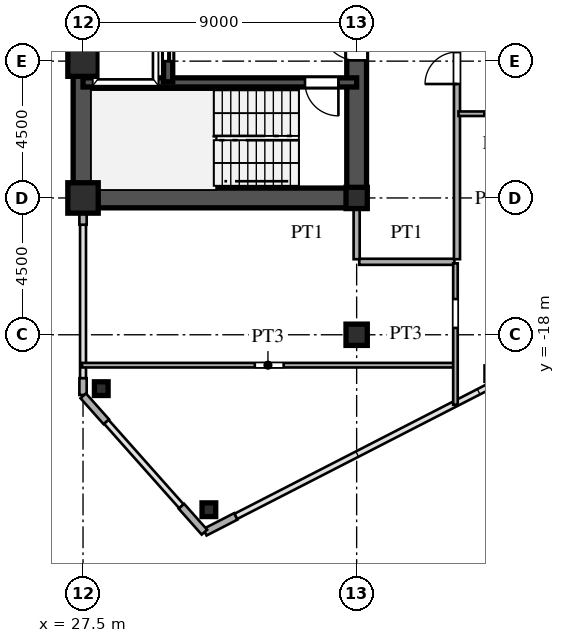
"""IFC4 building model, lengths in metres.
Left out: names, types, materials, properties, quantities, classifications, styles, units other than length and angle.
Written with IfcOpenShell. Run it as: python <this file> out.ifc"""

import sys

from ifc_helpers import new_model, si_unit, direction, frame, frame_2d, origin, origin_2d, place, context, subcontext, project, spatial, rectangle, hollow_rectangle, i_section, extrude, source, transform, mapped, element, fill, save


model = new_model("IFC4")
c1 = context("Model", 3, precision=1e-05, world=origin(), true_north=direction((0.0, 1.0)))
c2 = subcontext(c1, "Body", "Model", "MODEL_VIEW")
j1 = project(units=[si_unit("LENGTHUNIT", "METRE"), si_unit("PLANEANGLEUNIT", "RADIAN")], contexts=[c1])
p1 = place(None, origin())
s1 = spatial("IfcSite", under=j1, at=p1, CompositionType="ELEMENT")
p2 = place(p1, origin())
s2 = spatial("IfcBuilding", under=s1, at=p2, CompositionType="ELEMENT")
p3 = place(p2, frame((0.0, 0.0, 124.8)))
s3 = spatial("IfcBuildingStorey", under=s2, at=p3, CompositionType="ELEMENT", Elevation=124.8)
m1 = source(origin(), c2, "Body", "SweptSolid", [
    extrude(hollow_rectangle(XDim=1.0, YDim=1.0, WallThickness=0.042, at=origin_2d()), origin(), (0.0, 0.0, 1.0), 3.6),
])
for number, where, z_axis, x_axis in (
    (1, (27.5, -13.5, 0.0), (0.0, 0.0, 1.0), (1.0, 0.0, 0.0)),
    (2, (27.5, -9.0, 0.0), (0.0, 0.0, 1.0), (1.0, 0.0, 0.0)),
):
    element("IfcColumn", number, at=place(p3, frame(where, z_axis=z_axis, x_axis=x_axis)), inside=s3, PredefinedType="COLUMN", context=c2, shape_type="MappedRepresentation", body=[
        mapped(m1, transform((0.0, 0.0, 0.0), scale=1.0)),
    ])
m2 = source(origin(), c2, "Body", "SweptSolid", [
    extrude(i_section(OverallWidth=0.7, OverallDepth=0.7, WebThickness=0.028, FlangeThickness=0.045, at=origin_2d()), origin(), (0.0, 0.0, 1.0), 3.6),
])
for number, where, z_axis, x_axis in (
    (3, (36.5, -18.0, 0.0), (0.0, 0.0, 1.0), (1.0, 0.0, 0.0)),
    (4, (36.5, -13.5, 0.0), (0.0, 0.0, 1.0), (1.0, 0.0, 0.0)),
):
    element("IfcColumn", number, at=place(p3, frame(where, z_axis=z_axis, x_axis=x_axis)), inside=s3, PredefinedType="COLUMN", context=c2, shape_type="MappedRepresentation", body=[
        mapped(m2, transform((0.0, 0.0, 0.0), scale=1.0)),
    ])
m3 = source(origin(), c2, "Body", "SweptSolid", [
    extrude(hollow_rectangle(XDim=0.45, YDim=0.45, WallThickness=0.018, at=origin_2d()), origin(), (0.0, 0.0, 1.0), 3.6),
])
for number, where, z_axis, x_axis in (
    (5, (31.64, -23.754, 0.0), (0.0, 0.0, 1.0), (1.0, 0.0, 0.0)),
    (6, (28.1, -19.772, 0.0), (0.0, 0.0, 1.0), (1.0, 0.0, 0.0)),
):
    element("IfcColumn", number, at=place(p3, frame(where, z_axis=z_axis, x_axis=x_axis)), inside=s3, PredefinedType="COLUMN", context=c2, shape_type="MappedRepresentation", body=[
        mapped(m3, transform((0.0, 0.0, 0.0), scale=1.0)),
    ])
p4 = place(p3, frame((31.509, -24.495, 0.0), z_axis=(0.0, 0.0, 1.0), x_axis=(0.889797395748, 0.456355776255, 0.0)))
e7 = element("IfcWall", 7, at=p4, inside=s3, PredefinedType="SOLIDWALL", context=c2, shape_type="SweptSolid", body=[
    extrude(rectangle(XDim=1.14, YDim=0.24, at=frame_2d((0.57, 0.0))), origin(), (0.0, 0.0, 1.0), 3.38),
])
p5 = place(p3, frame((27.5, -19.98, 0.0), z_axis=(0.0, 0.0, 1.0), x_axis=(0.0, 1.0, 0.0)))
e8 = element("IfcWall", 8, at=p5, inside=s3, PredefinedType="SOLIDWALL", context=c2, shape_type="SweptSolid", body=[
    extrude(rectangle(XDim=0.55, YDim=0.24, at=frame_2d((0.275, 0.0))), origin(), (0.0, 0.0, 1.0), 3.38),
])
p6 = place(p3, frame((27.5, -14.38, 0.0), z_axis=(0.0, 0.0, 1.0), x_axis=(0.0, 1.0, 0.0)))
e9 = element("IfcWall", 9, at=p6, inside=s3, PredefinedType="SOLIDWALL", context=c2, shape_type="SweptSolid", body=[
    extrude(rectangle(XDim=0.55, YDim=0.24, at=frame_2d((0.275, 0.0))), origin(), (0.0, 0.0, 1.0), 2.88),
])
for number, where, z_axis, x_axis in (
    (10, (27.507, -20.008, 0.0), (0.0, 0.0, 1.0), (0.664, -0.747, 0.0)),
    (11, (30.736, -23.64, 0.0), (0.0, 0.0, 1.0), (0.664, -0.747, 0.0)),
):
    element("IfcWall", number, at=place(p3, frame(where, z_axis=z_axis, x_axis=x_axis)), inside=s3, PredefinedType="SOLIDWALL", context=c2, shape_type="SweptSolid", body=[
        extrude(rectangle(XDim=1.14, YDim=0.24, at=frame_2d((0.57, 0.0))), origin(), (0.0, 0.0, 1.0), 3.38),
    ])
p7 = place(p3, frame((27.5, -13.5, 0.0), z_axis=(0.0, 0.0, 1.0), x_axis=(0.0, 1.0, 0.0)))
e12 = element("IfcWall", 12, at=p7, inside=s3, PredefinedType="SHEAR", context=c2, shape_type="SweptSolid", body=[
    extrude(rectangle(XDim=12.2, YDim=0.65, at=frame_2d((6.1, 0.0))), origin(), (0.0, 0.0, 1.0), 3.38),
])
p8 = place(p3, frame((27.5, -13.5, 0.0), z_axis=(0.0, 0.0, 1.0), x_axis=(1.0, 0.0, 0.0)))
e13 = element("IfcWall", 13, at=p8, inside=s3, PredefinedType="SHEAR", context=c2, shape_type="SweptSolid", body=[
    extrude(rectangle(XDim=9.0, YDim=0.65, at=frame_2d((4.5, 0.0))), origin(), (0.0, 0.0, 1.0), 3.38),
])
p9 = place(p3, frame((36.5, -13.65, 0.0), z_axis=(0.0, 0.0, 1.0), x_axis=(0.0, 1.0, 0.0)))
e14 = element("IfcWall", 14, at=p9, inside=s3, PredefinedType="SHEAR", context=c2, shape_type="SweptSolid", body=[
    extrude(rectangle(XDim=7.15, YDim=0.65, at=frame_2d((3.575, 0.0))), origin(), (0.0, 0.0, 1.0), 3.38),
])
p10 = place(p9, frame((4.675, 0.0, 0.0)))
e15 = element("IfcOpeningElement", 15, at=p10, cuts=e14, PredefinedType="OPENING", context=c2, shape_type="SweptSolid", body=[
    extrude(rectangle(XDim=1.15, YDim=2.2, at=frame_2d((0.575, 1.1))), frame((0.0, 0.335, 0.0), z_axis=(0.0, -1.0, 0.0), x_axis=(1.0, 0.0, 0.0)), (0.0, 0.0, 1.0), 0.67),
])
p11 = place(p3, frame((27.5, -9.7, 0.0), z_axis=(0.0, 0.0, 1.0), x_axis=(1.0, 0.0, 0.0)))
e16 = element("IfcWall", 16, at=p11, inside=s3, PredefinedType="SHEAR", context=c2, shape_type="SweptSolid", body=[
    extrude(rectangle(XDim=9.0, YDim=0.3, at=frame_2d((4.5, 0.0))), origin(), (0.0, 0.0, 1.0), 3.38),
])
p12 = place(p11, frame((7.3, 0.0, 0.0)))
e17 = element("IfcOpeningElement", 17, at=p12, cuts=e16, PredefinedType="OPENING", context=c2, shape_type="SweptSolid", body=[
    extrude(rectangle(XDim=1.1, YDim=2.2, at=frame_2d((0.55, 1.1))), frame((0.0, 0.16, 0.0), z_axis=(0.0, -1.0, 0.0), x_axis=(1.0, 0.0, 0.0)), (0.0, 0.0, 1.0), 0.32),
])
p13 = place(p3, frame((30.3, -9.68, 0.0), z_axis=(0.0, 0.0, 1.0), x_axis=(0.0, 1.0, 0.0)))
e18 = element("IfcWall", 18, at=p13, inside=s3, PredefinedType="SHEAR", context=c2, shape_type="SweptSolid", body=[
    extrude(rectangle(XDim=2.56, YDim=0.3, at=frame_2d((1.28, 0.0))), origin(), (0.0, 0.0, 1.0), 3.38),
])
p14 = place(p13, frame((0.68, 0.0, 0.0)))
e19 = element("IfcOpeningElement", 19, at=p14, cuts=e18, PredefinedType="OPENING", context=c2, shape_type="SweptSolid", body=[
    extrude(rectangle(XDim=1.2, YDim=2.25, at=frame_2d((0.6, 1.125))), frame((0.0, 0.16, 0.0), z_axis=(0.0, -1.0, 0.0), x_axis=(1.0, 0.0, 0.0)), (0.0, 0.0, 1.0), 0.32),
])
p15 = place(p3, frame((27.465, -19.0, 0.0), z_axis=(0.0, 0.0, 1.0), x_axis=(1.0, 0.0, 0.0)))
e20 = element("IfcWall", 20, at=p15, inside=s3, PredefinedType="PARTITIONING", context=c2, shape_type="SweptSolid", body=[
    extrude(rectangle(XDim=12.235, YDim=0.15, at=frame_2d((6.117, 0.0))), origin(), (0.0, 0.0, 1.0), 3.38),
])
p16 = place(p15, frame((5.685, 0.0, 0.0)))
e21 = element("IfcOpeningElement", 21, at=p16, cuts=e20, PredefinedType="OPENING", context=c2, shape_type="SweptSolid", body=[
    extrude(rectangle(XDim=0.95, YDim=2.15, at=frame_2d((0.475, 1.075))), frame((0.0, 0.085, 0.0), z_axis=(0.0, -1.0, 0.0), x_axis=(1.0, 0.0, 0.0)), (0.0, 0.0, 1.0), 0.17),
])
p17 = place(p3, frame((36.585, -15.6, 0.0), z_axis=(0.0, 0.0, 1.0), x_axis=(1.0, 0.0, 0.0)))
e22 = element("IfcWall", 22, at=p17, inside=s3, PredefinedType="PARTITIONING", context=c2, shape_type="SweptSolid", body=[
    extrude(rectangle(XDim=3.13, YDim=0.2, at=frame_2d((1.565, 0.0))), origin(), (0.0, 0.0, 1.0), 3.38),
])
p18 = place(p3, frame((39.85, -10.73, 0.0), z_axis=(0.0, 0.0, 1.0), x_axis=(1.0, 0.0, 0.0)))
e23 = element("IfcWall", 23, at=p18, inside=s3, PredefinedType="PARTITIONING", context=c2, shape_type="SweptSolid", body=[
    extrude(rectangle(XDim=2.65, YDim=0.15, at=frame_2d((1.325, 0.0))), origin(), (0.0, 0.0, 1.0), 3.38),
])
p19 = place(p18, frame((0.85, 0.0, 0.0)))
e24 = element("IfcOpeningElement", 24, at=p19, cuts=e23, PredefinedType="OPENING", context=c2, shape_type="SweptSolid", body=[
    extrude(rectangle(XDim=0.95, YDim=2.15, at=frame_2d((0.475, 1.075))), frame((0.0, 0.085, 0.0), z_axis=(0.0, -1.0, 0.0), x_axis=(1.0, 0.0, 0.0)), (0.0, 0.0, 1.0), 0.17),
])
p20 = place(p3, frame((36.5, -15.515, 0.0), z_axis=(0.0, 0.0, 1.0), x_axis=(0.0, 1.0, 0.0)))
e25 = element("IfcWall", 25, at=p20, inside=s3, PredefinedType="PARTITIONING", context=c2, shape_type="SweptSolid", body=[
    extrude(rectangle(XDim=1.685, YDim=0.2, at=frame_2d((0.842, 0.0))), origin(), (0.0, 0.0, 1.0), 2.78),
])
p21 = place(p3, frame((39.75, -20.301, 0.0), z_axis=(0.0, 0.0, 1.0), x_axis=(0.0, 1.0, 0.0)))
e26 = element("IfcWall", 26, at=p21, inside=s3, PredefinedType="PARTITIONING", context=c2, shape_type="SweptSolid", body=[
    extrude(rectangle(XDim=4.651, YDim=0.15, at=frame_2d((2.326, 0.0))), origin(), (0.0, 0.0, 1.0), 3.38),
])
p22 = place(p21, frame((2.526, 0.0, 0.0)))
e27 = element("IfcOpeningElement", 27, at=p22, cuts=e26, PredefinedType="OPENING", context=c2, shape_type="SweptSolid", body=[
    extrude(rectangle(XDim=0.95, YDim=2.15, at=frame_2d((0.475, 1.075))), frame((0.0, 0.085, 0.0), z_axis=(0.0, -1.0, 0.0), x_axis=(1.0, 0.0, 0.0)), (0.0, 0.0, 1.0), 0.17),
])
p23 = place(p3, frame((39.8, -15.515, 0.0), z_axis=(0.0, 0.0, 1.0), x_axis=(0.0, 1.0, 0.0)))
e28 = element("IfcWall", 28, at=p23, inside=s3, PredefinedType="PARTITIONING", context=c2, shape_type="SweptSolid", body=[
    extrude(rectangle(XDim=31.03, YDim=0.2, at=frame_2d((15.515, 0.0))), origin(), (0.0, 0.0, 1.0), 3.38),
])
p24 = place(p23, frame((5.762, 0.0, 0.0)))
e29 = element("IfcOpeningElement", 29, at=p24, cuts=e28, PredefinedType="OPENING", context=c2, shape_type="SweptSolid", body=[
    extrude(rectangle(XDim=1.05, YDim=2.25, at=frame_2d((0.525, 1.125))), frame((0.0, 0.11, 0.0), z_axis=(0.0, -1.0, 0.0), x_axis=(1.0, 0.0, 0.0)), (0.0, 0.0, 1.0), 0.22),
])
p25 = place(p23, frame((18.301, 0.0, 0.0)))
e30 = element("IfcOpeningElement", 30, at=p25, cuts=e28, PredefinedType="OPENING", context=c2, shape_type="SweptSolid", body=[
    extrude(rectangle(XDim=1.05, YDim=2.25, at=frame_2d((0.525, 1.125))), frame((0.0, 0.11, 0.0), z_axis=(0.0, -1.0, 0.0), x_axis=(1.0, 0.0, 0.0)), (0.0, 0.0, 1.0), 0.22),
])
p26 = place(p23, frame((27.69, 0.0, 0.0)))
e31 = element("IfcOpeningElement", 31, at=p26, cuts=e28, PredefinedType="OPENING", context=c2, shape_type="SweptSolid", body=[
    extrude(rectangle(XDim=1.05, YDim=2.25, at=frame_2d((0.525, 1.125))), frame((0.0, 0.11, 0.0), z_axis=(0.0, -1.0, 0.0), x_axis=(1.0, 0.0, 0.0)), (0.0, 0.0, 1.0), 0.22),
])
m4 = source(origin(), c2, "Body", "SweptSolid", [
    extrude(rectangle(XDim=1.15, YDim=2.2, at=frame_2d((0.575, 1.1))), frame((0.0, 0.025, 0.0), z_axis=(0.0, -1.0, 0.0), x_axis=(1.0, 0.0, 0.0)), (0.0, 0.0, 1.0), 0.05),
])
p27 = place(p10, origin())
e32 = element("IfcDoor", 32, at=p27, inside=s3, OperationType="SINGLE_SWING_RIGHT", PredefinedType="DOOR", context=c2, shape_type="MappedRepresentation", body=[
    mapped(m4, transform((0.0, 0.0, 0.0), scale=1.0)),
])
fill(e15, e32)
m5 = source(origin(), c2, "Body", "SweptSolid", [
    extrude(rectangle(XDim=1.1, YDim=2.2, at=frame_2d((0.55, 1.1))), frame((0.0, 0.025, 0.0), z_axis=(0.0, -1.0, 0.0), x_axis=(1.0, 0.0, 0.0)), (0.0, 0.0, 1.0), 0.05),
])
p28 = place(p12, frame((1.1, 0.0, 0.0), z_axis=(0.0, 0.0, 1.0), x_axis=(-1.0, 0.0, 0.0)))
e33 = element("IfcDoor", 33, at=p28, inside=s3, OperationType="SINGLE_SWING_RIGHT", PredefinedType="DOOR", context=c2, shape_type="MappedRepresentation", body=[
    mapped(m5, transform((0.0, 0.0, 0.0), scale=1.0)),
])
fill(e17, e33)
m6 = source(origin(), c2, "Body", "SweptSolid", [
    extrude(rectangle(XDim=1.2, YDim=2.25, at=frame_2d((0.6, 1.125))), frame((0.0, 0.025, 0.0), z_axis=(0.0, -1.0, 0.0), x_axis=(1.0, 0.0, 0.0)), (0.0, 0.0, 1.0), 0.05),
])
p29 = place(p14, origin())
e34 = element("IfcDoor", 34, at=p29, inside=s3, OperationType="DOUBLE_DOOR_SLIDING", PredefinedType="DOOR", context=c2, shape_type="MappedRepresentation", body=[
    mapped(m6, transform((0.0, 0.0, 0.0), scale=1.0)),
])
fill(e19, e34)
m7 = source(origin(), c2, "Body", "SweptSolid", [
    extrude(rectangle(XDim=1.05, YDim=2.25, at=frame_2d((0.525, 1.125))), frame((0.0, 0.025, 0.0), z_axis=(0.0, -1.0, 0.0), x_axis=(1.0, 0.0, 0.0)), (0.0, 0.0, 1.0), 0.05),
])
p30 = place(p24, origin())
e35 = element("IfcDoor", 35, at=p30, inside=s3, OperationType="SINGLE_SWING_LEFT", PredefinedType="DOOR", context=c2, shape_type="MappedRepresentation", body=[
    mapped(m7, transform((0.0, 0.0, 0.0), scale=1.0)),
])
fill(e29, e35)
save(model, sys.argv[1])
